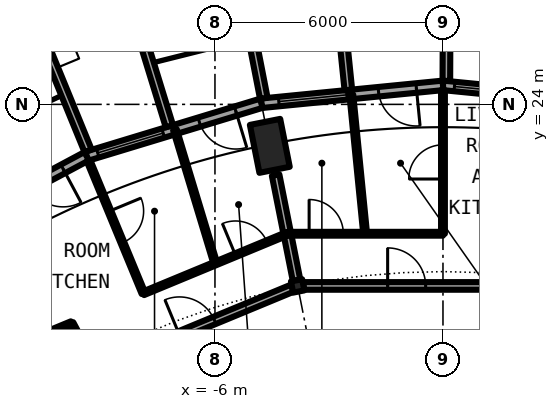
"""IFC4 building model, lengths in metres.
Left out: names, types, materials, properties, quantities, classifications, styles, units other than length and angle.
Written with IfcOpenShell. Run it as: python <this file> out.ifc"""

import sys

from ifc_helpers import new_model, si_unit, direction, frame, frame_2d, origin, origin_2d, place, context, subcontext, project, spatial, rectangle, hollow_circle, i_section, extrude, element, fill, save


model = new_model("IFC4")
c1 = context("Model", 3, precision=1e-05, world=origin(), true_north=direction((0.0, 1.0)))
c2 = subcontext(c1, "Body", "Model", "MODEL_VIEW")
j1 = project(units=[si_unit("LENGTHUNIT", "METRE"), si_unit("PLANEANGLEUNIT", "RADIAN")], contexts=[c1])
p1 = place(None, origin())
s1 = spatial("IfcSite", under=j1, at=p1, CompositionType="ELEMENT")
p2 = place(p1, origin())
s2 = spatial("IfcBuilding", under=s1, at=p2, CompositionType="ELEMENT")
p3 = place(p2, frame((0.0, 0.0, 246.25)))
s3 = spatial("IfcBuildingStorey", under=s2, at=p3, CompositionType="ELEMENT", Elevation=246.25)
p4 = place(p3, frame((-4.682, 23.539, 0.0), z_axis=(0.081376771682, -0.40910250457, 0.90885255228), x_axis=(0.980784718923, 0.195093144748, 0.0)))
e1 = element("IfcColumn", 1, at=p4, inside=s3, PredefinedType="COLUMN", context=c2, shape_type="SweptSolid", body=[
    extrude(hollow_circle(Radius=0.406, WallThickness=0.03, at=origin_2d()), origin(), (0.0, 0.0, 1.0), 3.081),
])
p5 = place(p3, frame((-3.824, 19.223, 0.0), z_axis=(0.0, 0.0, 1.0), x_axis=(-0.195090322016, 0.980785280403, 0.0)))
e2 = element("IfcColumn", 2, at=p5, inside=s3, PredefinedType="COLUMN", context=c2, shape_type="SweptSolid", body=[
    extrude(i_section(OverallWidth=0.3, OverallDepth=0.3, WebThickness=0.011, FlangeThickness=0.019, FilletRadius=0.027, at=origin_2d()), origin(), (0.0, 0.0, 1.0), 3.05),
])
p6 = place(p3, frame((4.78, 24.029, 0.0), z_axis=(0.0, 0.0, 1.0), x_axis=(-0.995181568754, 0.098049197923, 0.0)))
e3 = element("IfcWall", 3, at=p6, inside=s3, PredefinedType="SOLIDWALL", context=c2, shape_type="SweptSolid", body=[
    extrude(rectangle(XDim=4.803, YDim=0.25, at=frame_2d((2.402, 0.0))), origin(), (0.0, 0.0, 1.0), 2.7),
])
p7 = place(p6, frame((0.704, 0.0, 0.0)))
e4 = element("IfcOpeningElement", 4, at=p7, cuts=e3, PredefinedType="OPENING", context=c2, shape_type="SweptSolid", body=[
    extrude(rectangle(XDim=1.0, YDim=2.2, at=frame_2d((0.5, 1.1))), frame((0.0, 0.135, 0.0), z_axis=(0.0, -1.0, 0.0), x_axis=(1.0, 0.0, 0.0)), (0.0, 0.0, 1.0), 0.27),
])
p8 = place(p6, frame((2.699, 0.0, 0.3)))
e5 = element("IfcOpeningElement", 5, at=p8, cuts=e3, PredefinedType="OPENING", context=c2, shape_type="SweptSolid", body=[
    extrude(rectangle(XDim=1.8, YDim=2.1, at=frame_2d((0.9, 1.05))), frame((0.0, 0.135, 0.0), z_axis=(0.0, -1.0, 0.0), x_axis=(1.0, 0.0, 0.0)), (0.0, 0.0, 1.0), 0.27),
])
p9 = place(p3, frame((0.089, 24.617, -0.03), z_axis=(0.0, 0.0, 1.0), x_axis=(0.003811916396, 0.99999273462, 0.0)))
e6 = element("IfcWall", 6, at=p9, inside=s3, PredefinedType="SOLIDWALL", context=c2, shape_type="SweptSolid", body=[
    extrude(rectangle(XDim=2.882, YDim=0.2, at=frame_2d((1.441, 0.0))), origin(), (0.0, 0.0, 1.0), 2.73),
])
p10 = place(p3, frame((0.0, 24.5, 0.0), z_axis=(0.0, 0.0, 1.0), x_axis=(-0.995181568754, -0.098049197923, 0.0)))
e7 = element("IfcWall", 7, at=p10, inside=s3, PredefinedType="SOLIDWALL", context=c2, shape_type="SweptSolid", body=[
    extrude(rectangle(XDim=4.803, YDim=0.25, at=frame_2d((2.402, 0.0))), origin(), (0.0, 0.0, 1.0), 2.7),
])
p11 = place(p10, frame((0.704, 0.0, 0.0)))
e8 = element("IfcOpeningElement", 8, at=p11, cuts=e7, PredefinedType="OPENING", context=c2, shape_type="SweptSolid", body=[
    extrude(rectangle(XDim=1.0, YDim=2.2, at=frame_2d((0.5, 1.1))), frame((0.0, 0.135, 0.0), z_axis=(0.0, -1.0, 0.0), x_axis=(1.0, 0.0, 0.0)), (0.0, 0.0, 1.0), 0.27),
])
p12 = place(p10, frame((2.542, 0.0, 0.3)))
e9 = element("IfcOpeningElement", 9, at=p12, cuts=e7, PredefinedType="OPENING", context=c2, shape_type="SweptSolid", body=[
    extrude(rectangle(XDim=1.8, YDim=2.1, at=frame_2d((0.9, 1.05))), frame((0.0, 0.135, 0.0), z_axis=(0.0, -1.0, 0.0), x_axis=(1.0, 0.0, 0.0)), (0.0, 0.0, 1.0), 0.27),
])
p13 = place(p3, frame((-2.49, 24.38, -0.03), z_axis=(0.0, 0.0, 1.0), x_axis=(-0.101894312119, 0.994795229762, 0.0)))
e10 = element("IfcWall", 10, at=p13, inside=s3, PredefinedType="SOLIDWALL", context=c2, shape_type="SweptSolid", body=[
    extrude(rectangle(XDim=2.993, YDim=0.2, at=frame_2d((1.496, 0.0))), origin(), (0.0, 0.0, 1.0), 2.73),
])
p14 = place(p3, frame((-4.715, 24.161, -0.03), z_axis=(0.0, 0.0, 1.0), x_axis=(-0.191440729923, 0.981504175705, 0.0)))
e11 = element("IfcWall", 11, at=p14, inside=s3, PredefinedType="SOLIDWALL", context=c2, shape_type="SweptSolid", body=[
    extrude(rectangle(XDim=2.883, YDim=0.2, at=frame_2d((1.442, 0.0))), origin(), (0.0, 0.0, 1.0), 2.73),
])
p15 = place(p3, frame((-4.78, 24.029, 0.0), z_axis=(0.0, 0.0, 1.0), x_axis=(-0.956947414517, -0.290261340605, 0.0)))
e12 = element("IfcWall", 12, at=p15, inside=s3, PredefinedType="SOLIDWALL", context=c2, shape_type="SweptSolid", body=[
    extrude(rectangle(XDim=4.803, YDim=0.25, at=frame_2d((2.401, 0.0))), origin(), (0.0, 0.0, 1.0), 2.7),
])
p16 = place(p15, frame((0.704, 0.0, 0.0)))
e13 = element("IfcOpeningElement", 13, at=p16, cuts=e12, PredefinedType="OPENING", context=c2, shape_type="SweptSolid", body=[
    extrude(rectangle(XDim=1.0, YDim=2.2, at=frame_2d((0.5, 1.1))), frame((0.0, 0.135, 0.0), z_axis=(0.0, -1.0, 0.0), x_axis=(1.0, 0.0, 0.0)), (0.0, 0.0, 1.0), 0.27),
])
p17 = place(p15, frame((2.699, 0.0, 0.3)))
e14 = element("IfcOpeningElement", 14, at=p17, cuts=e12, PredefinedType="OPENING", context=c2, shape_type="SweptSolid", body=[
    extrude(rectangle(XDim=1.8, YDim=2.1, at=frame_2d((0.9, 1.05))), frame((0.0, 0.135, 0.0), z_axis=(0.0, -1.0, 0.0), x_axis=(1.0, 0.0, 0.0)), (0.0, 0.0, 1.0), 0.27),
])
p18 = place(p3, frame((-7.199, 23.426, -0.03), z_axis=(0.0, 0.0, 1.0), x_axis=(-0.293764720054, 0.95587775853, 0.0)))
e15 = element("IfcWall", 15, at=p18, inside=s3, PredefinedType="SOLIDWALL", context=c2, shape_type="SweptSolid", body=[
    extrude(rectangle(XDim=2.992, YDim=0.2, at=frame_2d((1.496, 0.0))), origin(), (0.0, 0.0, 1.0), 2.73),
])
p19 = place(p3, frame((-9.338, 22.777, -0.03), z_axis=(0.0, 0.0, 1.0), x_axis=(-0.379219850791, 0.925306600412, 0.0)))
e16 = element("IfcWall", 16, at=p19, inside=s3, PredefinedType="SOLIDWALL", context=c2, shape_type="SweptSolid", body=[
    extrude(rectangle(XDim=2.882, YDim=0.2, at=frame_2d((1.441, 0.0))), origin(), (0.0, 0.0, 1.0), 2.73),
])
p20 = place(p3, frame((-9.376, 22.635, 0.0), z_axis=(0.0, 0.0, 1.0), x_axis=(-0.881903608701, -0.471429766731, 0.0)))
e17 = element("IfcWall", 17, at=p20, inside=s3, PredefinedType="SOLIDWALL", context=c2, shape_type="SweptSolid", body=[
    extrude(rectangle(XDim=4.802, YDim=0.25, at=frame_2d((2.401, 0.0))), origin(), (0.0, 0.0, 1.0), 2.7),
])
p21 = place(p20, frame((0.704, 0.0, 0.0)))
e18 = element("IfcOpeningElement", 18, at=p21, cuts=e17, PredefinedType="OPENING", context=c2, shape_type="SweptSolid", body=[
    extrude(rectangle(XDim=1.0, YDim=2.2, at=frame_2d((0.5, 1.1))), frame((0.0, 0.135, 0.0), z_axis=(0.0, -1.0, 0.0), x_axis=(1.0, 0.0, 0.0)), (0.0, 0.0, 1.0), 0.27),
])
p22 = place(p20, frame((2.542, 0.0, 0.3)))
e19 = element("IfcOpeningElement", 19, at=p22, cuts=e17, PredefinedType="OPENING", context=c2, shape_type="SweptSolid", body=[
    extrude(rectangle(XDim=1.8, YDim=2.1, at=frame_2d((0.9, 1.05))), frame((0.0, 0.135, 0.0), z_axis=(0.0, -1.0, 0.0), x_axis=(1.0, 0.0, 0.0)), (0.0, 0.0, 1.0), 0.27),
])
p23 = place(p3, frame((-9.774, 18.245, 0.0), z_axis=(0.0, 0.0, 1.0), x_axis=(0.471597872193, -0.881813725762, 0.0)))
e20 = element("IfcWall", 20, at=p23, inside=s3, PredefinedType="PARTITIONING", context=c2, shape_type="SweptSolid", body=[
    extrude(rectangle(XDim=1.38, YDim=0.1, at=frame_2d((0.69, 0.0))), origin(), (0.0, 0.0, 1.0), 2.7),
])
p24 = place(p3, frame((-9.328, 22.52, 0.0), z_axis=(0.0, 0.0, 1.0), x_axis=(0.382637120452, -0.923898714174, 0.0)))
e21 = element("IfcWall", 21, at=p24, inside=s3, PredefinedType="PARTITIONING", context=c2, shape_type="SweptSolid", body=[
    extrude(rectangle(XDim=3.779, YDim=0.1, at=frame_2d((1.889, 0.0))), origin(), (0.0, 0.0, 1.0), 2.7),
])
p25 = place(p24, frame((1.439, 0.0, 0.0)))
e22 = element("IfcOpeningElement", 22, at=p25, cuts=e21, PredefinedType="OPENING", context=c2, shape_type="SweptSolid", body=[
    extrude(rectangle(XDim=0.9, YDim=2.3, at=frame_2d((0.45, 1.15))), frame((0.0, 0.06, 0.0), z_axis=(0.0, -1.0, 0.0), x_axis=(1.0, 0.0, 0.0)), (0.0, 0.0, 1.0), 0.12),
])
p26 = place(p3, frame((-7.053, 23.332, 0.0), z_axis=(0.0, 0.0, 1.0), x_axis=(0.289406481695, -0.957206293519, 0.0)))
e23 = element("IfcWall", 23, at=p26, inside=s3, PredefinedType="PARTITIONING", context=c2, shape_type="SweptSolid", body=[
    extrude(rectangle(XDim=3.676, YDim=0.1, at=frame_2d((1.838, 0.0))), origin(), (0.0, 0.0, 1.0), 2.7),
])
p27 = place(p3, frame((-4.404, 22.139, 0.0), z_axis=(0.0, 0.0, 1.0), x_axis=(0.19518472663, -0.980766497435, 0.0)))
e24 = element("IfcWall", 24, at=p27, inside=s3, PredefinedType="PARTITIONING", context=c2, shape_type="SweptSolid", body=[
    extrude(rectangle(XDim=2.823, YDim=0.2, at=frame_2d((1.412, 0.0))), origin(), (0.0, 0.0, 1.0), 2.7),
])
p28 = place(p3, frame((-2.412, 24.255, 0.0), z_axis=(0.0, 0.0, 1.0), x_axis=(0.09899751331, -0.995087680739, 0.0)))
e25 = element("IfcWall", 25, at=p28, inside=s3, PredefinedType="PARTITIONING", context=c2, shape_type="SweptSolid", body=[
    extrude(rectangle(XDim=3.677, YDim=0.1, at=frame_2d((1.838, 0.0))), origin(), (0.0, 0.0, 1.0), 2.7),
])
p29 = place(p3, frame((0.0, 20.596, 0.0), z_axis=(0.0, 0.0, 1.0), x_axis=(0.0, 1.0, 0.0)))
e26 = element("IfcWall", 26, at=p29, inside=s3, PredefinedType="PARTITIONING", context=c2, shape_type="SweptSolid", body=[
    extrude(rectangle(XDim=3.779, YDim=0.1, at=frame_2d((1.89, 0.0))), origin(), (0.0, 0.0, 1.0), 2.7),
])
p30 = place(p29, frame((1.44, 0.0, 0.0)))
e27 = element("IfcOpeningElement", 27, at=p30, cuts=e26, PredefinedType="OPENING", context=c2, shape_type="SweptSolid", body=[
    extrude(rectangle(XDim=0.9, YDim=2.3, at=frame_2d((0.45, 1.15))), frame((0.0, 0.06, 0.0), z_axis=(0.0, -1.0, 0.0), x_axis=(1.0, 0.0, 0.0)), (0.0, 0.0, 1.0), 0.12),
])
p31 = place(p3, frame((-10.748, 16.355, 0.0), z_axis=(0.0, 0.0, 1.0), x_axis=(0.92395118465, 0.382510402975, 0.0)))
e28 = element("IfcWall", 28, at=p31, inside=s3, PredefinedType="PARTITIONING", context=c2, shape_type="SweptSolid", body=[
    extrude(rectangle(XDim=7.341, YDim=0.2, at=frame_2d((3.671, 0.0))), origin(), (0.0, 0.0, 1.0), 2.45),
])
p32 = place(p31, frame((4.127, 0.0, 0.0)))
e29 = element("IfcOpeningElement", 29, at=p32, cuts=e28, PredefinedType="OPENING", context=c2, shape_type="SweptSolid", body=[
    extrude(rectangle(XDim=1.0, YDim=2.3, at=frame_2d((0.5, 1.15))), frame((0.0, 0.11, 0.0), z_axis=(0.0, -1.0, 0.0), x_axis=(1.0, 0.0, 0.0)), (0.0, 0.0, 1.0), 0.22),
])
p33 = place(p3, frame((-3.671, 19.223, 0.0), z_axis=(0.0, 0.0, 1.0), x_axis=(1.0, 0.0, 0.0)))
e30 = element("IfcWall", 30, at=p33, inside=s3, PredefinedType="PARTITIONING", context=c2, shape_type="SweptSolid", body=[
    extrude(rectangle(XDim=7.342, YDim=0.2, at=frame_2d((3.671, 0.0))), origin(), (0.0, 0.0, 1.0), 2.45),
])
p34 = place(p33, frame((2.215, 0.0, 0.0)))
e31 = element("IfcOpeningElement", 31, at=p34, cuts=e30, PredefinedType="OPENING", context=c2, shape_type="SweptSolid", body=[
    extrude(rectangle(XDim=1.0, YDim=2.3, at=frame_2d((0.5, 1.15))), frame((0.0, 0.11, 0.0), z_axis=(0.0, -1.0, 0.0), x_axis=(1.0, 0.0, 0.0)), (0.0, 0.0, 1.0), 0.22),
])
p35 = place(p3, frame((-11.667, 17.461, 0.0), z_axis=(0.0, 0.0, 1.0), x_axis=(0.923871611223, 0.382702555487, 0.0)))
e32 = element("IfcWall", 32, at=p35, inside=s3, PredefinedType="PARTITIONING", context=c2, shape_type="SweptSolid", body=[
    extrude(rectangle(XDim=2.049, YDim=0.1, at=frame_2d((1.024, 0.0))), origin(), (0.0, 0.0, 1.0), 2.7),
])
p36 = place(p35, frame((0.574, 0.0, 0.0)))
e33 = element("IfcOpeningElement", 33, at=p36, cuts=e32, PredefinedType="OPENING", context=c2, shape_type="SweptSolid", body=[
    extrude(rectangle(XDim=0.9, YDim=2.3, at=frame_2d((0.45, 1.15))), frame((0.0, 0.06, 0.0), z_axis=(0.0, -1.0, 0.0), x_axis=(1.0, 0.0, 0.0)), (0.0, 0.0, 1.0), 0.12),
])
p37 = place(p3, frame((-7.884, 19.028, 0.0), z_axis=(0.0, 0.0, 1.0), x_axis=(0.923919487387, 0.382586958517, 0.0)))
e34 = element("IfcWall", 34, at=p37, inside=s3, PredefinedType="PARTITIONING", context=c2, shape_type="SweptSolid", body=[
    extrude(rectangle(XDim=4.095, YDim=0.1, at=frame_2d((2.048, 0.0))), origin(), (0.0, 0.0, 1.0), 2.7),
])
p38 = place(p37, frame((2.624, 0.0, 0.0)))
e35 = element("IfcOpeningElement", 35, at=p38, cuts=e34, PredefinedType="OPENING", context=c2, shape_type="SweptSolid", body=[
    extrude(rectangle(XDim=0.9, YDim=2.3, at=frame_2d((0.45, 1.15))), frame((0.0, 0.06, 0.0), z_axis=(0.0, -1.0, 0.0), x_axis=(1.0, 0.0, 0.0)), (0.0, 0.0, 1.0), 0.12),
])
p39 = place(p3, frame((-4.097, 20.596, 0.0), z_axis=(0.0, 0.0, 1.0), x_axis=(1.0, 0.0, 0.0)))
e36 = element("IfcWall", 36, at=p39, inside=s3, PredefinedType="PARTITIONING", context=c2, shape_type="SweptSolid", body=[
    extrude(rectangle(XDim=4.097, YDim=0.1, at=frame_2d((2.048, 0.0))), origin(), (0.0, 0.0, 1.0), 2.7),
])
p40 = place(p39, frame((0.575, 0.0, 0.0)))
e37 = element("IfcOpeningElement", 37, at=p40, cuts=e36, PredefinedType="OPENING", context=c2, shape_type="SweptSolid", body=[
    extrude(rectangle(XDim=0.9, YDim=2.3, at=frame_2d((0.45, 1.15))), frame((0.0, 0.06, 0.0), z_axis=(0.0, -1.0, 0.0), x_axis=(1.0, 0.0, 0.0)), (0.0, 0.0, 1.0), 0.12),
])
p41 = place(p8, origin())
e38 = element("IfcWindow", 38, at=p41, inside=s3, PartitioningType="SINGLE_PANEL", PredefinedType="WINDOW", context=c2, shape_type="SweptSolid", body=[
    extrude(rectangle(XDim=1.8, YDim=2.1, at=frame_2d((0.9, 1.05))), frame((0.0, 0.03, 0.0), z_axis=(0.0, -1.0, 0.0), x_axis=(1.0, 0.0, 0.0)), (0.0, 0.0, 1.0), 0.06),
])
fill(e5, e38)
p42 = place(p11, origin())
e39 = element("IfcDoor", 39, at=p42, inside=s3, OperationType="SINGLE_SWING_LEFT", PredefinedType="DOOR", context=c2, shape_type="SweptSolid", body=[
    extrude(rectangle(XDim=1.0, YDim=2.2, at=frame_2d((0.5, 1.1))), frame((0.0, 0.025, 0.0), z_axis=(0.0, -1.0, 0.0), x_axis=(1.0, 0.0, 0.0)), (0.0, 0.0, 1.0), 0.05),
])
fill(e8, e39)
p43 = place(p12, origin())
e40 = element("IfcWindow", 40, at=p43, inside=s3, PartitioningType="SINGLE_PANEL", PredefinedType="WINDOW", context=c2, shape_type="SweptSolid", body=[
    extrude(rectangle(XDim=1.8, YDim=2.1, at=frame_2d((0.9, 1.05))), frame((0.0, 0.03, 0.0), z_axis=(0.0, -1.0, 0.0), x_axis=(1.0, 0.0, 0.0)), (0.0, 0.0, 1.0), 0.06),
])
fill(e9, e40)
p44 = place(p16, origin())
e41 = element("IfcDoor", 41, at=p44, inside=s3, OperationType="SINGLE_SWING_LEFT", PredefinedType="DOOR", context=c2, shape_type="SweptSolid", body=[
    extrude(rectangle(XDim=1.0, YDim=2.2, at=frame_2d((0.5, 1.1))), frame((0.0, 0.025, 0.0), z_axis=(0.0, -1.0, 0.0), x_axis=(1.0, 0.0, 0.0)), (0.0, 0.0, 1.0), 0.05),
])
fill(e13, e41)
p45 = place(p17, origin())
e42 = element("IfcWindow", 42, at=p45, inside=s3, PartitioningType="SINGLE_PANEL", PredefinedType="WINDOW", context=c2, shape_type="SweptSolid", body=[
    extrude(rectangle(XDim=1.8, YDim=2.1, at=frame_2d((0.9, 1.05))), frame((0.0, 0.03, 0.0), z_axis=(0.0, -1.0, 0.0), x_axis=(1.0, 0.0, 0.0)), (0.0, 0.0, 1.0), 0.06),
])
fill(e14, e42)
p46 = place(p21, origin())
e43 = element("IfcDoor", 43, at=p46, inside=s3, OperationType="SINGLE_SWING_LEFT", PredefinedType="DOOR", context=c2, shape_type="SweptSolid", body=[
    extrude(rectangle(XDim=1.0, YDim=2.2, at=frame_2d((0.5, 1.1))), frame((0.0, 0.025, 0.0), z_axis=(0.0, -1.0, 0.0), x_axis=(1.0, 0.0, 0.0)), (0.0, 0.0, 1.0), 0.05),
])
fill(e18, e43)
p47 = place(p34, origin())
e44 = element("IfcDoor", 44, at=p47, inside=s3, OperationType="SINGLE_SWING_LEFT", PredefinedType="DOOR", context=c2, shape_type="SweptSolid", body=[
    extrude(rectangle(XDim=1.0, YDim=2.3, at=frame_2d((0.5, 1.15))), frame((0.0, 0.025, 0.0), z_axis=(0.0, -1.0, 0.0), x_axis=(1.0, 0.0, 0.0)), (0.0, 0.0, 1.0), 0.05),
])
fill(e31, e44)
p48 = place(p30, origin())
e45 = element("IfcDoor", 45, at=p48, inside=s3, OperationType="SINGLE_SWING_RIGHT", PredefinedType="DOOR", context=c2, shape_type="SweptSolid", body=[
    extrude(rectangle(XDim=0.9, YDim=2.3, at=frame_2d((0.45, 1.15))), frame((0.0, 0.025, 0.0), z_axis=(0.0, -1.0, 0.0), x_axis=(1.0, 0.0, 0.0)), (0.0, 0.0, 1.0), 0.05),
])
fill(e27, e45)
p49 = place(p40, origin())
e46 = element("IfcDoor", 46, at=p49, inside=s3, OperationType="SINGLE_SWING_LEFT", PredefinedType="DOOR", context=c2, shape_type="SweptSolid", body=[
    extrude(rectangle(XDim=0.9, YDim=2.3, at=frame_2d((0.45, 1.15))), frame((0.0, 0.025, 0.0), z_axis=(0.0, -1.0, 0.0), x_axis=(1.0, 0.0, 0.0)), (0.0, 0.0, 1.0), 0.05),
])
fill(e37, e46)
p50 = place(p32, origin())
e47 = element("IfcDoor", 47, at=p50, inside=s3, OperationType="SINGLE_SWING_RIGHT", PredefinedType="DOOR", context=c2, shape_type="SweptSolid", body=[
    extrude(rectangle(XDim=1.0, YDim=2.3, at=frame_2d((0.5, 1.15))), frame((0.0, 0.025, 0.0), z_axis=(0.0, -1.0, 0.0), x_axis=(1.0, 0.0, 0.0)), (0.0, 0.0, 1.0), 0.05),
])
fill(e29, e47)
p51 = place(p25, origin())
e48 = element("IfcDoor", 48, at=p51, inside=s3, OperationType="SINGLE_SWING_RIGHT", PredefinedType="DOOR", context=c2, shape_type="SweptSolid", body=[
    extrude(rectangle(XDim=0.9, YDim=2.3, at=frame_2d((0.45, 1.15))), frame((0.0, 0.025, 0.0), z_axis=(0.0, -1.0, 0.0), x_axis=(1.0, 0.0, 0.0)), (0.0, 0.0, 1.0), 0.05),
])
fill(e22, e48)
p52 = place(p38, origin())
e49 = element("IfcDoor", 49, at=p52, inside=s3, OperationType="SINGLE_SWING_RIGHT", PredefinedType="DOOR", context=c2, shape_type="SweptSolid", body=[
    extrude(rectangle(XDim=0.9, YDim=2.3, at=frame_2d((0.45, 1.15))), frame((0.0, 0.025, 0.0), z_axis=(0.0, -1.0, 0.0), x_axis=(1.0, 0.0, 0.0)), (0.0, 0.0, 1.0), 0.05),
])
fill(e35, e49)
save(model, sys.argv[1])
